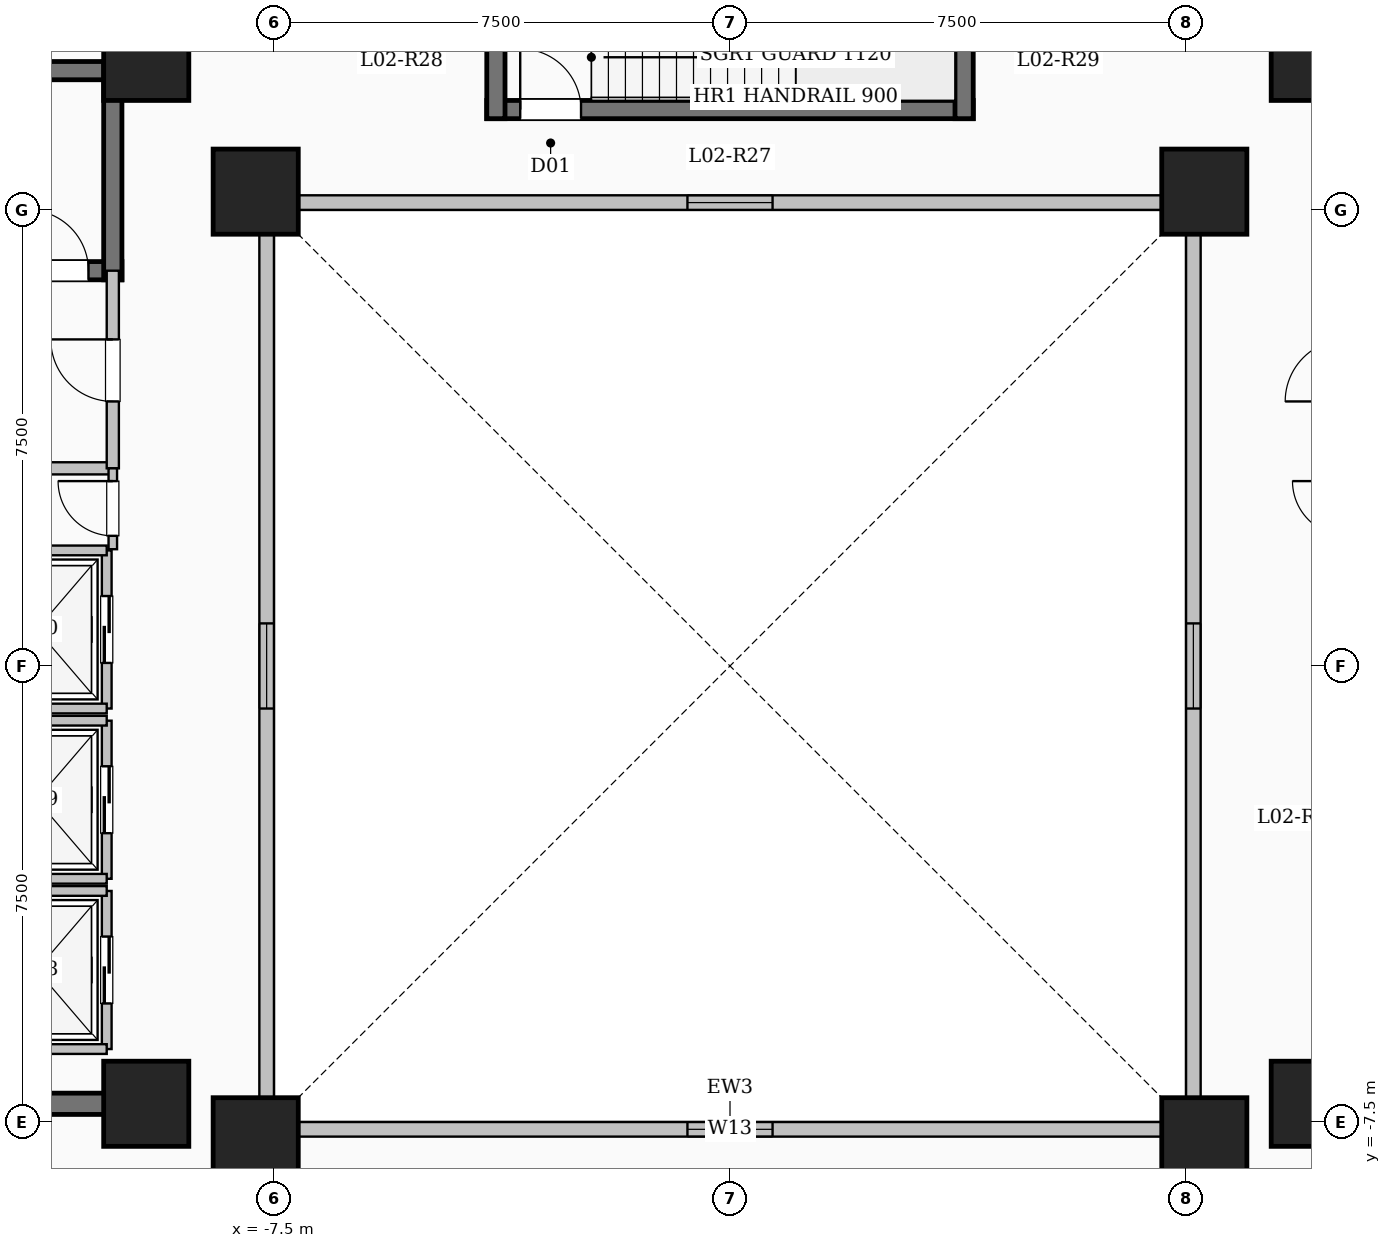
"""IFC4 building model, lengths in metres.
Left out: names, types, materials, properties, quantities, classifications, styles, units other than length and angle.
Written with IfcOpenShell. Run it as: python <this file> out.ifc"""

import sys

from ifc_helpers import new_model, si_unit, direction, frame, frame_2d, origin, origin_2d, place, context, subcontext, project, spatial, rectangle, extrude, element, fill, save


model = new_model("IFC4")
c1 = context("Model", 3, precision=1e-05, world=origin(), true_north=direction((0.0, 1.0)))
c2 = subcontext(c1, "Body", "Model", "MODEL_VIEW")
j1 = project(units=[si_unit("LENGTHUNIT", "METRE"), si_unit("PLANEANGLEUNIT", "RADIAN")], contexts=[c1])
p1 = place(None, origin())
s1 = spatial("IfcSite", under=j1, at=p1, CompositionType="ELEMENT")
p2 = place(p1, origin())
s2 = spatial("IfcBuilding", under=s1, at=p2, CompositionType="ELEMENT")
p3 = place(p2, frame((0.0, 0.0, 9.9)))
s3 = spatial("IfcBuildingStorey", under=s2, at=p3, CompositionType="ELEMENT", Elevation=9.9)
for number, where, z_axis, x_axis in (
    (1, (-7.8, -7.8, 0.0), (0.0, 0.0, 1.0), (1.0, 0.0, 0.0)),
    (2, (7.8, -7.8, 0.0), (0.0, 0.0, 1.0), (1.0, 0.0, 0.0)),
    (3, (-7.8, 7.8, 0.0), (0.0, 0.0, 1.0), (1.0, 0.0, 0.0)),
    (4, (7.8, 7.8, 0.0), (0.0, 0.0, 1.0), (1.0, 0.0, 0.0)),
    (5, (-9.6, -7.2, 0.0), (0.0, 0.0, 1.0), (1.0, 0.0, 0.0)),
    (6, (-9.6, 10.0, 0.0), (0.0, 0.0, 1.0), (1.0, 0.0, 0.0)),
    (7, (9.6, -7.2, 0.0), (0.0, 0.0, 1.0), (1.0, 0.0, 0.0)),
    (8, (9.6, 10.0, 0.0), (0.0, 0.0, 1.0), (1.0, 0.0, 0.0)),
):
    element("IfcColumn", number, at=place(p3, frame(where, z_axis=z_axis, x_axis=x_axis)), inside=s3, PredefinedType="COLUMN", context=c2, shape_type="SweptSolid", body=[
        extrude(rectangle(XDim=1.4, YDim=1.4, at=origin_2d()), origin(), (0.0, 0.0, 1.0), 4.5),
    ])
p4 = place(p3, frame((-7.62, -7.62, 0.0), z_axis=(0.0, 0.0, 1.0), x_axis=(1.0, 0.0, 0.0)))
e9 = element("IfcWall", 9, at=p4, inside=s3, PredefinedType="SOLIDWALL", context=c2, shape_type="SweptSolid", body=[
    extrude(rectangle(XDim=15.24, YDim=0.24, at=frame_2d((7.62, 0.0))), origin(), (0.0, 0.0, 1.0), 4.2),
])
p5 = place(p4, frame((6.92, 0.0, 0.95)))
e10 = element("IfcOpeningElement", 10, at=p5, cuts=e9, PredefinedType="OPENING", context=c2, shape_type="SweptSolid", body=[
    extrude(rectangle(XDim=1.4, YDim=1.5, at=frame_2d((0.7, 0.75))), frame((0.0, 0.13, 0.0), z_axis=(0.0, -1.0, 0.0), x_axis=(1.0, 0.0, 0.0)), (0.0, 0.0, 1.0), 0.26),
])
p6 = place(p3, frame((7.62, -7.62, 0.0), z_axis=(0.0, 0.0, 1.0), x_axis=(0.0, 1.0, 0.0)))
e11 = element("IfcWall", 11, at=p6, inside=s3, PredefinedType="SOLIDWALL", context=c2, shape_type="SweptSolid", body=[
    extrude(rectangle(XDim=15.24, YDim=0.24, at=frame_2d((7.62, 0.0))), origin(), (0.0, 0.0, 1.0), 4.2),
])
p7 = place(p6, frame((6.92, 0.0, 0.95)))
e12 = element("IfcOpeningElement", 12, at=p7, cuts=e11, PredefinedType="OPENING", context=c2, shape_type="SweptSolid", body=[
    extrude(rectangle(XDim=1.4, YDim=1.5, at=frame_2d((0.7, 0.75))), frame((0.0, 0.13, 0.0), z_axis=(0.0, -1.0, 0.0), x_axis=(1.0, 0.0, 0.0)), (0.0, 0.0, 1.0), 0.26),
])
p8 = place(p3, frame((7.62, 7.62, 0.0), z_axis=(0.0, 0.0, 1.0), x_axis=(-1.0, 0.0, 0.0)))
e13 = element("IfcWall", 13, at=p8, inside=s3, PredefinedType="SOLIDWALL", context=c2, shape_type="SweptSolid", body=[
    extrude(rectangle(XDim=15.24, YDim=0.24, at=frame_2d((7.62, 0.0))), origin(), (0.0, 0.0, 1.0), 4.2),
])
p9 = place(p8, frame((6.92, 0.0, 0.95)))
e14 = element("IfcOpeningElement", 14, at=p9, cuts=e13, PredefinedType="OPENING", context=c2, shape_type="SweptSolid", body=[
    extrude(rectangle(XDim=1.4, YDim=1.5, at=frame_2d((0.7, 0.75))), frame((0.0, 0.13, 0.0), z_axis=(0.0, -1.0, 0.0), x_axis=(1.0, 0.0, 0.0)), (0.0, 0.0, 1.0), 0.26),
])
p10 = place(p3, frame((-7.62, 7.62, 0.0), z_axis=(0.0, 0.0, 1.0), x_axis=(0.0, -1.0, 0.0)))
e15 = element("IfcWall", 15, at=p10, inside=s3, PredefinedType="SOLIDWALL", context=c2, shape_type="SweptSolid", body=[
    extrude(rectangle(XDim=15.24, YDim=0.24, at=frame_2d((7.62, 0.0))), origin(), (0.0, 0.0, 1.0), 4.2),
])
p11 = place(p10, frame((6.92, 0.0, 0.95)))
e16 = element("IfcOpeningElement", 16, at=p11, cuts=e15, PredefinedType="OPENING", context=c2, shape_type="SweptSolid", body=[
    extrude(rectangle(XDim=1.4, YDim=1.5, at=frame_2d((0.7, 0.75))), frame((0.0, 0.13, 0.0), z_axis=(0.0, -1.0, 0.0), x_axis=(1.0, 0.0, 0.0)), (0.0, 0.0, 1.0), 0.26),
])
p12 = place(p3, frame((-18.0, 9.79, 0.0), z_axis=(0.0, 0.0, 1.0), x_axis=(1.0, 0.0, 0.0)))
e17 = element("IfcWall", 17, at=p12, inside=s3, PredefinedType="SHEAR", context=c2, shape_type="SweptSolid", body=[
    extrude(rectangle(XDim=8.0, YDim=0.3, at=frame_2d((4.0, 0.0))), origin(), (0.0, 0.0, 1.0), 4.5),
])
p13 = place(p3, frame((-18.0, 6.5, 0.0), z_axis=(0.0, 0.0, 1.0), x_axis=(1.0, 0.0, 0.0)))
e18 = element("IfcWall", 18, at=p13, inside=s3, PredefinedType="SHEAR", context=c2, shape_type="SweptSolid", body=[
    extrude(rectangle(XDim=8.0, YDim=0.3, at=frame_2d((4.0, 0.0))), origin(), (0.0, 0.0, 1.0), 4.5),
])
p14 = place(p13, frame((6.45, 0.0, 0.0)))
e19 = element("IfcOpeningElement", 19, at=p14, cuts=e18, PredefinedType="OPENING", context=c2, shape_type="SweptSolid", body=[
    extrude(rectangle(XDim=1.0, YDim=2.15, at=frame_2d((0.5, 1.075))), frame((0.0, 0.16, 0.0), z_axis=(0.0, -1.0, 0.0), x_axis=(1.0, 0.0, 0.0)), (0.0, 0.0, 1.0), 0.32),
])
p15 = place(p3, frame((-10.15, 6.35, 0.0), z_axis=(0.0, 0.0, 1.0), x_axis=(0.0, 1.0, 0.0)))
e20 = element("IfcWall", 20, at=p15, inside=s3, PredefinedType="SHEAR", context=c2, shape_type="SweptSolid", body=[
    extrude(rectangle(XDim=3.59, YDim=0.3, at=frame_2d((1.795, 0.0))), origin(), (0.0, 0.0, 1.0), 4.5),
])
p16 = place(p3, frame((-4.0, 9.15, 0.0), z_axis=(0.0, 0.0, 1.0), x_axis=(1.0, 0.0, 0.0)))
e21 = element("IfcWall", 21, at=p16, inside=s3, PredefinedType="SHEAR", context=c2, shape_type="SweptSolid", body=[
    extrude(rectangle(XDim=8.0, YDim=0.3, at=frame_2d((4.0, 0.0))), origin(), (0.0, 0.0, 1.0), 4.5),
])
p17 = place(p16, frame((0.55, 0.0, 0.0)))
e22 = element("IfcOpeningElement", 22, at=p17, cuts=e21, PredefinedType="OPENING", context=c2, shape_type="SweptSolid", body=[
    extrude(rectangle(XDim=1.0, YDim=2.15, at=frame_2d((0.5, 1.075))), frame((0.0, 0.16, 0.0), z_axis=(0.0, -1.0, 0.0), x_axis=(1.0, 0.0, 0.0)), (0.0, 0.0, 1.0), 0.32),
])
for number, where, z_axis, x_axis in (
    (23, (-3.85, 9.0, 0.0), (0.0, 0.0, 1.0), (0.0, 1.0, 0.0)),
    (24, (3.85, 9.0, 0.0), (0.0, 0.0, 1.0), (0.0, 1.0, 0.0)),
):
    element("IfcWall", number, at=place(p3, frame(where, z_axis=z_axis, x_axis=x_axis)), inside=s3, PredefinedType="SHEAR", context=c2, shape_type="SweptSolid", body=[
        extrude(rectangle(XDim=3.59, YDim=0.3, at=frame_2d((1.795, 0.0))), origin(), (0.0, 0.0, 1.0), 4.5),
    ])
p18 = place(p3, frame((-15.55, 3.25, 0.0), z_axis=(0.0, 0.0, 1.0), x_axis=(1.0, 0.0, 0.0)))
e25 = element("IfcWall", 25, at=p18, inside=s3, PredefinedType="SOLIDWALL", context=c2, shape_type="SweptSolid", body=[
    extrude(rectangle(XDim=5.4, YDim=0.2, at=frame_2d((2.7, 0.0))), origin(), (0.0, 0.0, 1.0), 4.2),
])
p19 = place(p3, frame((-10.15, 3.25, 0.0), z_axis=(0.0, 0.0, 1.0), x_axis=(0.0, 1.0, 0.0)))
e26 = element("IfcWall", 26, at=p19, inside=s3, PredefinedType="SOLIDWALL", context=c2, shape_type="SweptSolid", body=[
    extrude(rectangle(XDim=3.25, YDim=0.2, at=frame_2d((1.625, 0.0))), origin(), (0.0, 0.0, 1.0), 4.2),
])
p20 = place(p19, frame((1.1, 0.0, 0.0)))
e27 = element("IfcOpeningElement", 27, at=p20, cuts=e26, PredefinedType="OPENING", context=c2, shape_type="SweptSolid", body=[
    extrude(rectangle(XDim=1.02, YDim=2.15, at=frame_2d((0.51, 1.075))), frame((0.0, 0.11, 0.0), z_axis=(0.0, -1.0, 0.0), x_axis=(1.0, 0.0, 0.0)), (0.0, 0.0, 1.0), 0.22),
])
p21 = place(p3, frame((-10.25, -6.3, 0.0), z_axis=(0.0, 0.0, 1.0), x_axis=(0.0, 1.0, 0.0)))
e28 = element("IfcWall", 28, at=p21, inside=s3, PredefinedType="SOLIDWALL", context=c2, shape_type="SweptSolid", body=[
    extrude(rectangle(XDim=2.6, YDim=0.16, at=frame_2d((1.3, 0.0))), origin(), (0.0, 0.0, 1.0), 4.2),
])
p22 = place(p21, frame((0.75, 0.0, 0.0)))
e29 = element("IfcOpeningElement", 29, at=p22, cuts=e28, PredefinedType="OPENING", context=c2, shape_type="SweptSolid", body=[
    extrude(rectangle(XDim=1.1, YDim=2.15, at=frame_2d((0.55, 1.075))), frame((0.0, 0.09, 0.0), z_axis=(0.0, -1.0, 0.0), x_axis=(1.0, 0.0, 0.0)), (0.0, 0.0, 1.0), 0.18),
])
for number, where, z_axis, x_axis in (
    (30, (-12.55, -6.3, 0.0), (0.0, 0.0, 1.0), (1.0, 0.0, 0.0)),
    (31, (-12.55, -3.7, 0.0), (0.0, 0.0, 1.0), (1.0, 0.0, 0.0)),
):
    element("IfcWall", number, at=place(p3, frame(where, z_axis=z_axis, x_axis=x_axis)), inside=s3, PredefinedType="SOLIDWALL", context=c2, shape_type="SweptSolid", body=[
        extrude(rectangle(XDim=2.3, YDim=0.16, at=frame_2d((1.15, 0.0))), origin(), (0.0, 0.0, 1.0), 4.2),
    ])
p23 = place(p3, frame((-10.25, -3.5, 0.0), z_axis=(0.0, 0.0, 1.0), x_axis=(0.0, 1.0, 0.0)))
e32 = element("IfcWall", 32, at=p23, inside=s3, PredefinedType="SOLIDWALL", context=c2, shape_type="SweptSolid", body=[
    extrude(rectangle(XDim=2.6, YDim=0.16, at=frame_2d((1.3, 0.0))), origin(), (0.0, 0.0, 1.0), 4.2),
])
p24 = place(p23, frame((0.75, 0.0, 0.0)))
e33 = element("IfcOpeningElement", 33, at=p24, cuts=e32, PredefinedType="OPENING", context=c2, shape_type="SweptSolid", body=[
    extrude(rectangle(XDim=1.1, YDim=2.15, at=frame_2d((0.55, 1.075))), frame((0.0, 0.09, 0.0), z_axis=(0.0, -1.0, 0.0), x_axis=(1.0, 0.0, 0.0)), (0.0, 0.0, 1.0), 0.18),
])
for number, where, z_axis, x_axis in (
    (34, (-12.55, -3.5, 0.0), (0.0, 0.0, 1.0), (1.0, 0.0, 0.0)),
    (35, (-12.55, -0.9, 0.0), (0.0, 0.0, 1.0), (1.0, 0.0, 0.0)),
):
    element("IfcWall", number, at=place(p3, frame(where, z_axis=z_axis, x_axis=x_axis)), inside=s3, PredefinedType="SOLIDWALL", context=c2, shape_type="SweptSolid", body=[
        extrude(rectangle(XDim=2.3, YDim=0.16, at=frame_2d((1.15, 0.0))), origin(), (0.0, 0.0, 1.0), 4.2),
    ])
p25 = place(p3, frame((-10.25, -0.7, 0.0), z_axis=(0.0, 0.0, 1.0), x_axis=(0.0, 1.0, 0.0)))
e36 = element("IfcWall", 36, at=p25, inside=s3, PredefinedType="SOLIDWALL", context=c2, shape_type="SweptSolid", body=[
    extrude(rectangle(XDim=2.6, YDim=0.16, at=frame_2d((1.3, 0.0))), origin(), (0.0, 0.0, 1.0), 4.2),
])
p26 = place(p25, frame((0.75, 0.0, 0.0)))
e37 = element("IfcOpeningElement", 37, at=p26, cuts=e36, PredefinedType="OPENING", context=c2, shape_type="SweptSolid", body=[
    extrude(rectangle(XDim=1.1, YDim=2.15, at=frame_2d((0.55, 1.075))), frame((0.0, 0.09, 0.0), z_axis=(0.0, -1.0, 0.0), x_axis=(1.0, 0.0, 0.0)), (0.0, 0.0, 1.0), 0.18),
])
for number, where, z_axis, x_axis in (
    (38, (-12.55, -0.7, 0.0), (0.0, 0.0, 1.0), (1.0, 0.0, 0.0)),
    (39, (-12.55, 1.9, 0.0), (0.0, 0.0, 1.0), (1.0, 0.0, 0.0)),
):
    element("IfcWall", number, at=place(p3, frame(where, z_axis=z_axis, x_axis=x_axis)), inside=s3, PredefinedType="SOLIDWALL", context=c2, shape_type="SweptSolid", body=[
        extrude(rectangle(XDim=2.3, YDim=0.16, at=frame_2d((1.15, 0.0))), origin(), (0.0, 0.0, 1.0), 4.2),
    ])
p27 = place(p3, frame((-18.625, -7.2, 0.0), z_axis=(0.0, 0.0, 1.0), x_axis=(1.0, 0.0, 0.0)))
e40 = element("IfcWall", 40, at=p27, inside=s3, PredefinedType="SHEAR", context=c2, shape_type="SweptSolid", body=[
    extrude(rectangle(XDim=8.55, YDim=0.35, at=frame_2d((4.275, 0.0))), origin(), (0.0, 0.0, 1.0), 4.5),
])
p28 = place(p3, frame((-10.15, 1.92, 0.0), z_axis=(0.0, 0.0, 1.0), x_axis=(0.0, 1.0, 0.0)))
e41 = element("IfcWall", 41, at=p28, inside=s3, PredefinedType="PARTITIONING", context=c2, shape_type="SweptSolid", body=[
    extrude(rectangle(XDim=1.33, YDim=0.14, at=frame_2d((0.665, 0.0))), origin(), (0.0, 0.0, 1.0), 4.2),
])
p29 = place(p28, frame((0.22, 0.0, 0.0)))
e42 = element("IfcOpeningElement", 42, at=p29, cuts=e41, PredefinedType="OPENING", context=c2, shape_type="SweptSolid", body=[
    extrude(rectangle(XDim=0.9, YDim=2.08, at=frame_2d((0.45, 1.04))), frame((0.0, 0.08, 0.0), z_axis=(0.0, -1.0, 0.0), x_axis=(1.0, 0.0, 0.0)), (0.0, 0.0, 1.0), 0.16),
])
p30 = place(p5, origin())
e43 = element("IfcWindow", 43, at=p30, inside=s3, PartitioningType="SINGLE_PANEL", PredefinedType="WINDOW", context=c2, shape_type="SweptSolid", body=[
    extrude(rectangle(XDim=1.4, YDim=1.5, at=frame_2d((0.7, 0.75))), frame((0.0, 0.03, 0.0), z_axis=(0.0, -1.0, 0.0), x_axis=(1.0, 0.0, 0.0)), (0.0, 0.0, 1.0), 0.06),
])
fill(e10, e43)
p31 = place(p7, origin())
e44 = element("IfcWindow", 44, at=p31, inside=s3, PartitioningType="SINGLE_PANEL", PredefinedType="WINDOW", context=c2, shape_type="SweptSolid", body=[
    extrude(rectangle(XDim=1.4, YDim=1.5, at=frame_2d((0.7, 0.75))), frame((0.0, 0.03, 0.0), z_axis=(0.0, -1.0, 0.0), x_axis=(1.0, 0.0, 0.0)), (0.0, 0.0, 1.0), 0.06),
])
fill(e12, e44)
p32 = place(p9, origin())
e45 = element("IfcWindow", 45, at=p32, inside=s3, PartitioningType="SINGLE_PANEL", PredefinedType="WINDOW", context=c2, shape_type="SweptSolid", body=[
    extrude(rectangle(XDim=1.4, YDim=1.5, at=frame_2d((0.7, 0.75))), frame((0.0, 0.03, 0.0), z_axis=(0.0, -1.0, 0.0), x_axis=(1.0, 0.0, 0.0)), (0.0, 0.0, 1.0), 0.06),
])
fill(e14, e45)
p33 = place(p11, origin())
e46 = element("IfcWindow", 46, at=p33, inside=s3, PartitioningType="SINGLE_PANEL", PredefinedType="WINDOW", context=c2, shape_type="SweptSolid", body=[
    extrude(rectangle(XDim=1.4, YDim=1.5, at=frame_2d((0.7, 0.75))), frame((0.0, 0.03, 0.0), z_axis=(0.0, -1.0, 0.0), x_axis=(1.0, 0.0, 0.0)), (0.0, 0.0, 1.0), 0.06),
])
fill(e16, e46)
p34 = place(p14, origin())
e47 = element("IfcDoor", 47, at=p34, inside=s3, OperationType="SINGLE_SWING_LEFT", PredefinedType="DOOR", context=c2, shape_type="SweptSolid", body=[
    extrude(rectangle(XDim=1.0, YDim=2.15, at=frame_2d((0.5, 1.075))), frame((0.0, 0.025, 0.0), z_axis=(0.0, -1.0, 0.0), x_axis=(1.0, 0.0, 0.0)), (0.0, 0.0, 1.0), 0.05),
])
fill(e19, e47)
p35 = place(p17, origin())
e48 = element("IfcDoor", 48, at=p35, inside=s3, OperationType="SINGLE_SWING_LEFT", PredefinedType="DOOR", context=c2, shape_type="SweptSolid", body=[
    extrude(rectangle(XDim=1.0, YDim=2.15, at=frame_2d((0.5, 1.075))), frame((0.0, 0.025, 0.0), z_axis=(0.0, -1.0, 0.0), x_axis=(1.0, 0.0, 0.0)), (0.0, 0.0, 1.0), 0.05),
])
fill(e22, e48)
p36 = place(p20, origin())
e49 = element("IfcDoor", 49, at=p36, inside=s3, OperationType="SINGLE_SWING_RIGHT", PredefinedType="DOOR", context=c2, shape_type="SweptSolid", body=[
    extrude(rectangle(XDim=1.02, YDim=2.15, at=frame_2d((0.51, 1.075))), frame((0.0, 0.025, 0.0), z_axis=(0.0, -1.0, 0.0), x_axis=(1.0, 0.0, 0.0)), (0.0, 0.0, 1.0), 0.05),
])
fill(e27, e49)
p37 = place(p22, origin())
e50 = element("IfcDoor", 50, at=p37, inside=s3, OperationType="SLIDING_TO_LEFT", PredefinedType="DOOR", context=c2, shape_type="SweptSolid", body=[
    extrude(rectangle(XDim=1.1, YDim=2.15, at=frame_2d((0.55, 1.075))), frame((0.0, 0.025, 0.0), z_axis=(0.0, -1.0, 0.0), x_axis=(1.0, 0.0, 0.0)), (0.0, 0.0, 1.0), 0.05),
])
fill(e29, e50)
p38 = place(p24, origin())
e51 = element("IfcDoor", 51, at=p38, inside=s3, OperationType="SLIDING_TO_LEFT", PredefinedType="DOOR", context=c2, shape_type="SweptSolid", body=[
    extrude(rectangle(XDim=1.1, YDim=2.15, at=frame_2d((0.55, 1.075))), frame((0.0, 0.025, 0.0), z_axis=(0.0, -1.0, 0.0), x_axis=(1.0, 0.0, 0.0)), (0.0, 0.0, 1.0), 0.05),
])
fill(e33, e51)
p39 = place(p26, origin())
e52 = element("IfcDoor", 52, at=p39, inside=s3, OperationType="SLIDING_TO_LEFT", PredefinedType="DOOR", context=c2, shape_type="SweptSolid", body=[
    extrude(rectangle(XDim=1.1, YDim=2.15, at=frame_2d((0.55, 1.075))), frame((0.0, 0.025, 0.0), z_axis=(0.0, -1.0, 0.0), x_axis=(1.0, 0.0, 0.0)), (0.0, 0.0, 1.0), 0.05),
])
fill(e37, e52)
p40 = place(p29, origin())
e53 = element("IfcDoor", 53, at=p40, inside=s3, OperationType="SINGLE_SWING_RIGHT", PredefinedType="DOOR", context=c2, shape_type="SweptSolid", body=[
    extrude(rectangle(XDim=0.9, YDim=2.08, at=frame_2d((0.45, 1.04))), frame((0.0, 0.025, 0.0), z_axis=(0.0, -1.0, 0.0), x_axis=(1.0, 0.0, 0.0)), (0.0, 0.0, 1.0), 0.05),
])
fill(e42, e53)
save(model, sys.argv[1])
